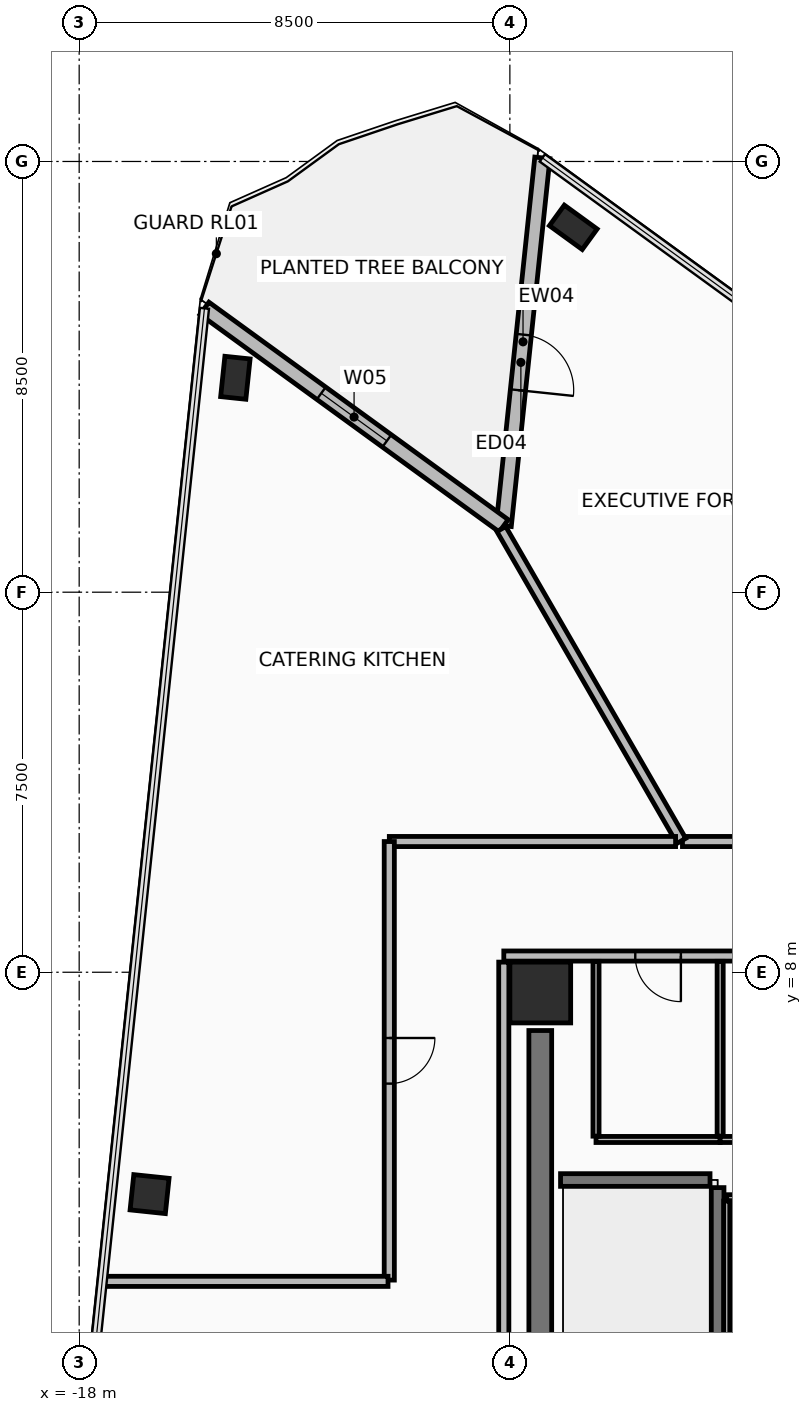
"""IFC4 building model, lengths in metres.
Left out: names, types, materials, properties, quantities, classifications, styles, units other than length and angle.
Written with IfcOpenShell. Run it as: python <this file> out.ifc"""

import sys

from ifc_helpers import new_model, si_unit, direction, frame, frame_2d, origin, origin_2d, place, context, subcontext, project, spatial, rectangle, hollow_rectangle, extrude, element, fill, save


model = new_model("IFC4")
c1 = context("Model", 3, precision=1e-05, world=origin(), true_north=direction((0.0, 1.0)))
c2 = subcontext(c1, "Body", "Model", "MODEL_VIEW")
j1 = project(units=[si_unit("LENGTHUNIT", "METRE"), si_unit("PLANEANGLEUNIT", "RADIAN")], contexts=[c1])
p1 = place(None, origin())
s1 = spatial("IfcSite", under=j1, at=p1, CompositionType="ELEMENT")
p2 = place(p1, origin())
s2 = spatial("IfcBuilding", under=s1, at=p2, CompositionType="ELEMENT")
p3 = place(p2, frame((0.0, 0.0, 130.45)))
s3 = spatial("IfcBuildingStorey", under=s2, at=p3, CompositionType="ELEMENT", Elevation=130.45)
p4 = place(p3, frame((-8.9, 7.6, 0.0), z_axis=(0.0, 0.0, 1.0), x_axis=(1.0, 0.0, 0.0)))
e1 = element("IfcColumn", 1, at=p4, inside=s3, PredefinedType="COLUMN", context=c2, shape_type="SweptSolid", body=[
    extrude(rectangle(XDim=1.2, YDim=1.2, at=origin_2d()), origin(), (0.0, 0.0, 1.0), 3.6),
])
p5 = place(p3, frame((-14.917, 19.731, 0.0), z_axis=(0.0, 0.0, 1.0), x_axis=(0.104530199036, 0.99452171293, 0.0)))
e2 = element("IfcColumn", 2, at=p5, inside=s3, PredefinedType="COLUMN", context=c2, shape_type="SweptSolid", body=[
    extrude(hollow_rectangle(XDim=0.5, YDim=0.8, WallThickness=0.04, at=origin_2d()), origin(), (0.0, 0.0, 1.0), 3.6),
])
p6 = place(p3, frame((-16.611, 3.622, 0.0), z_axis=(0.0, 0.0, 1.0), x_axis=(0.104530199036, 0.99452171293, 0.0)))
e3 = element("IfcColumn", 3, at=p6, inside=s3, PredefinedType="COLUMN", context=c2, shape_type="SweptSolid", body=[
    extrude(hollow_rectangle(XDim=0.7, YDim=0.7, WallThickness=0.04, at=origin_2d()), origin(), (0.0, 0.0, 1.0), 3.6),
])
p7 = place(p3, frame((-8.249, 22.701, 0.0), z_axis=(0.0, 0.0, 1.0), x_axis=(-0.809016994375, 0.587785252292, 0.0)))
e4 = element("IfcColumn", 4, at=p7, inside=s3, PredefinedType="COLUMN", context=c2, shape_type="SweptSolid", body=[
    extrude(hollow_rectangle(XDim=0.5, YDim=0.8, WallThickness=0.04, at=origin_2d()), origin(), (0.0, 0.0, 1.0), 3.6),
])
p8 = place(p3, frame((-8.859, 24.071, 0.0), z_axis=(0.0, 0.0, 1.0), x_axis=(-0.104512431924, -0.9945235802, 0.0)))
e5 = element("IfcWall", 5, at=p8, inside=s3, PredefinedType="STANDARD", context=c2, shape_type="SweptSolid", body=[
    extrude(rectangle(XDim=7.3, YDim=0.3, at=frame_2d((3.65, 0.0))), origin(), (0.0, 0.0, 1.0), 2.705),
])
p9 = place(p8, frame((3.508, 0.0, 0.0)))
e6 = element("IfcOpeningElement", 6, at=p9, cuts=e5, PredefinedType="OPENING", context=c2, shape_type="SweptSolid", body=[
    extrude(rectangle(XDim=1.1, YDim=2.2, at=frame_2d((0.55, 1.1))), frame((0.0, 0.16, 0.0), z_axis=(0.0, -1.0, 0.0), x_axis=(1.0, 0.0, 0.0)), (0.0, 0.0, 1.0), 0.32),
])
p10 = place(p3, frame((-9.622, 16.811, 0.0), z_axis=(0.0, 0.0, 1.0), x_axis=(-0.809002104592, 0.587805745775, 0.0)))
e7 = element("IfcWall", 7, at=p10, inside=s3, PredefinedType="STANDARD", context=c2, shape_type="SweptSolid", body=[
    extrude(rectangle(XDim=7.3, YDim=0.3, at=frame_2d((3.65, 0.0))), origin(), (0.0, 0.0, 1.0), 2.705),
])
p11 = place(p10, frame((2.85, 0.0, 0.325)))
e8 = element("IfcOpeningElement", 8, at=p11, cuts=e7, PredefinedType="OPENING", context=c2, shape_type="SweptSolid", body=[
    extrude(rectangle(XDim=1.6, YDim=2.2, at=frame_2d((0.8, 1.1))), frame((0.0, 0.16, 0.0), z_axis=(0.0, -1.0, 0.0), x_axis=(1.0, 0.0, 0.0)), (0.0, 0.0, 1.0), 0.32),
])
p12 = place(p3, frame((-8.9, -3.85, 0.0), z_axis=(0.0, 0.0, 1.0), x_axis=(0.0, 1.0, 0.0)))
e9 = element("IfcWall", 9, at=p12, inside=s3, PredefinedType="SHEAR", context=c2, shape_type="SweptSolid", body=[
    extrude(rectangle(XDim=10.7, YDim=0.45, at=frame_2d((5.35, 0.0))), origin(), (0.0, 0.0, 1.0), 3.41),
])
p13 = place(p3, frame((9.62, 8.32, 0.0), z_axis=(0.0, 0.0, 1.0), x_axis=(-1.0, 0.0, 0.0)))
e10 = element("IfcWall", 10, at=p13, inside=s3, PredefinedType="PARTITIONING", context=c2, shape_type="SweptSolid", body=[
    extrude(rectangle(XDim=19.24, YDim=0.2, at=frame_2d((9.62, 0.0))), origin(), (0.0, 0.0, 1.0), 2.755),
])
p14 = place(p13, frame((15.745, 0.0, 0.0)))
e11 = element("IfcOpeningElement", 11, at=p14, cuts=e10, PredefinedType="OPENING", context=c2, shape_type="SweptSolid", body=[
    extrude(rectangle(XDim=0.9, YDim=2.1, at=frame_2d((0.45, 1.05))), frame((0.0, 0.11, 0.0), z_axis=(0.0, -1.0, 0.0), x_axis=(1.0, 0.0, 0.0)), (0.0, 0.0, 1.0), 0.22),
])
p15 = place(p13, frame((13.795, 0.0, 0.0)))
e12 = element("IfcOpeningElement", 12, at=p15, cuts=e10, PredefinedType="OPENING", context=c2, shape_type="SweptSolid", body=[
    extrude(rectangle(XDim=0.9, YDim=2.1, at=frame_2d((0.45, 1.05))), frame((0.0, 0.11, 0.0), z_axis=(0.0, -1.0, 0.0), x_axis=(1.0, 0.0, 0.0)), (0.0, 0.0, 1.0), 0.22),
])
p16 = place(p3, frame((-9.62, 8.2, 0.0), z_axis=(0.0, 0.0, 1.0), x_axis=(0.0, -1.0, 0.0)))
e13 = element("IfcWall", 13, at=p16, inside=s3, PredefinedType="PARTITIONING", context=c2, shape_type="SweptSolid", body=[
    extrude(rectangle(XDim=16.4, YDim=0.2, at=frame_2d((8.2, 0.0))), origin(), (0.0, 0.0, 1.0), 2.855),
])
p17 = place(p16, frame((12.65, 0.0, 0.0)))
e14 = element("IfcOpeningElement", 14, at=p17, cuts=e13, PredefinedType="OPENING", context=c2, shape_type="SweptSolid", body=[
    extrude(rectangle(XDim=1.1, YDim=2.15, at=frame_2d((0.55, 1.075))), frame((0.0, 0.11, 0.0), z_axis=(0.0, -1.0, 0.0), x_axis=(1.0, 0.0, 0.0)), (0.0, 0.0, 1.0), 0.22),
])
p18 = place(p3, frame((-5.4, -3.55, 0.0), z_axis=(0.0, 0.0, 1.0), x_axis=(0.0, 1.0, 0.0)))
e15 = element("IfcWall", 15, at=p18, inside=s3, PredefinedType="SHEAR", context=c2, shape_type="SweptSolid", body=[
    extrude(rectangle(XDim=7.3, YDim=0.25, at=frame_2d((3.65, 0.0))), origin(), (0.0, 0.0, 1.0), 3.41),
])
p19 = place(p3, frame((-8.5, 3.9, 0.0), z_axis=(0.0, 0.0, 1.0), x_axis=(1.0, 0.0, 0.0)))
e16 = element("IfcWall", 16, at=p19, inside=s3, PredefinedType="SHEAR", context=c2, shape_type="SweptSolid", body=[
    extrude(rectangle(XDim=2.95, YDim=0.25, at=frame_2d((1.475, 0.0))), origin(), (0.0, 0.0, 1.0), 3.41),
])
p20 = place(p3, frame((-2.115, 3.55, 0.0), z_axis=(0.0, 0.0, 1.0), x_axis=(-1.0, 0.0, 0.0)))
e17 = element("IfcWall", 17, at=p20, inside=s3, PredefinedType="PARTITIONING", context=c2, shape_type="SweptSolid", body=[
    extrude(rectangle(XDim=3.105, YDim=0.12, at=frame_2d((1.552, 0.0))), origin(), (0.0, 0.0, 1.0), 3.41),
])
p21 = place(p3, frame((-5.22, 3.485, 0.0), z_axis=(0.0, 0.0, 1.0), x_axis=(0.0, -1.0, 0.0)))
e18 = element("IfcWall", 18, at=p21, inside=s3, PredefinedType="PARTITIONING", context=c2, shape_type="SweptSolid", body=[
    extrude(rectangle(XDim=2.97, YDim=0.12, at=frame_2d((1.485, 0.0))), origin(), (0.0, 0.0, 1.0), 3.41),
])
p22 = place(p3, frame((-7.8, 4.7, 0.0), z_axis=(0.0, 0.0, 1.0), x_axis=(1.0, 0.0, 0.0)))
e19 = element("IfcWall", 19, at=p22, inside=s3, PredefinedType="PARTITIONING", context=c2, shape_type="SweptSolid", body=[
    extrude(rectangle(XDim=2.45, YDim=0.12, at=frame_2d((1.225, 0.0))), origin(), (0.0, 0.0, 1.0), 3.41),
])
for number, where, z_axis, x_axis in (
    (20, (-5.35, 4.765, 0.0), (0.0, 0.0, 1.0), (0.0, 1.0, 0.0)),
    (21, (-7.8, 8.215, 0.0), (0.0, 0.0, 1.0), (0.0, -1.0, 0.0)),
):
    element("IfcWall", number, at=place(p3, frame(where, z_axis=z_axis, x_axis=x_axis)), inside=s3, PredefinedType="PARTITIONING", context=c2, shape_type="SweptSolid", body=[
        extrude(rectangle(XDim=3.45, YDim=0.12, at=frame_2d((1.725, 0.0))), origin(), (0.0, 0.0, 1.0), 2.605),
    ])
p23 = place(p3, frame((-5.35, 4.7, 0.0), z_axis=(0.0, 0.0, 1.0), x_axis=(1.0, 0.0, 0.0)))
e22 = element("IfcWall", 22, at=p23, inside=s3, PredefinedType="PARTITIONING", context=c2, shape_type="SweptSolid", body=[
    extrude(rectangle(XDim=1.45, YDim=0.12, at=frame_2d((0.725, 0.0))), origin(), (0.0, 0.0, 1.0), 3.41),
])
p24 = place(p3, frame((-2.025, 10.58, 0.0), z_axis=(0.0, 0.0, 1.0), x_axis=(-1.0, 0.0, 0.0)))
e23 = element("IfcWall", 23, at=p24, inside=s3, PredefinedType="PARTITIONING", context=c2, shape_type="SweptSolid", body=[
    extrude(rectangle(XDim=4.069, YDim=0.2, at=frame_2d((2.035, 0.0))), origin(), (0.0, 0.0, 1.0), 3.41),
])
p25 = place(p3, frame((-6.115, 10.593, 0.0), z_axis=(0.0, 0.0, 1.0), x_axis=(-0.50001885532, 0.866014517387, 0.0)))
e24 = element("IfcWall", 24, at=p25, inside=s3, PredefinedType="PARTITIONING", context=c2, shape_type="SweptSolid", body=[
    extrude(rectangle(XDim=7.106, YDim=0.2, at=frame_2d((3.553, 0.0))), origin(), (0.0, 0.0, 1.0), 2.855),
])
p26 = place(p3, frame((-6.229, 10.58, 0.0), z_axis=(0.0, 0.0, 1.0), x_axis=(-1.0, 0.0, 0.0)))
e25 = element("IfcWall", 25, at=p26, inside=s3, PredefinedType="PARTITIONING", context=c2, shape_type="SweptSolid", body=[
    extrude(rectangle(XDim=5.65, YDim=0.2, at=frame_2d((2.825, 0.0))), origin(), (0.0, 0.0, 1.0), 2.755),
])
p27 = place(p3, frame((-11.88, 10.579, 0.0), z_axis=(0.0, 0.0, 1.0), x_axis=(0.0, -1.0, 0.0)))
e26 = element("IfcWall", 26, at=p27, inside=s3, PredefinedType="PARTITIONING", context=c2, shape_type="SweptSolid", body=[
    extrude(rectangle(XDim=8.654, YDim=0.2, at=frame_2d((4.327, 0.0))), origin(), (0.0, 0.0, 1.0), 2.855),
])
p28 = place(p27, frame((3.877, 0.0, 0.0)))
e27 = element("IfcOpeningElement", 27, at=p28, cuts=e26, PredefinedType="OPENING", context=c2, shape_type="SweptSolid", body=[
    extrude(rectangle(XDim=0.9, YDim=2.1, at=frame_2d((0.45, 1.05))), frame((0.0, 0.11, 0.0), z_axis=(0.0, -1.0, 0.0), x_axis=(1.0, 0.0, 0.0)), (0.0, 0.0, 1.0), 0.22),
])
p29 = place(p3, frame((-11.905, 1.9, 0.0), z_axis=(0.0, 0.0, 1.0), x_axis=(-1.0, 0.0, 0.0)))
e28 = element("IfcWall", 28, at=p29, inside=s3, PredefinedType="PARTITIONING", context=c2, shape_type="SweptSolid", body=[
    extrude(rectangle(XDim=5.641, YDim=0.2, at=frame_2d((2.82, 0.0))), origin(), (0.0, 0.0, 1.0), 2.705),
])
p30 = place(p9, frame((1.1, 0.0, 0.0), z_axis=(0.0, 0.0, 1.0), x_axis=(-1.0, 0.0, 0.0)))
e29 = element("IfcDoor", 29, at=p30, inside=s3, OperationType="SINGLE_SWING_LEFT", PredefinedType="DOOR", context=c2, shape_type="SweptSolid", body=[
    extrude(rectangle(XDim=1.1, YDim=2.2, at=frame_2d((0.55, 1.1))), frame((0.0, 0.025, 0.0), z_axis=(0.0, -1.0, 0.0), x_axis=(1.0, 0.0, 0.0)), (0.0, 0.0, 1.0), 0.05),
])
fill(e6, e29)
p31 = place(p11, origin())
e30 = element("IfcWindow", 30, at=p31, inside=s3, PartitioningType="SINGLE_PANEL", PredefinedType="WINDOW", context=c2, shape_type="SweptSolid", body=[
    extrude(rectangle(XDim=1.6, YDim=2.2, at=frame_2d((0.8, 1.1))), frame((0.0, 0.03, 0.0), z_axis=(0.0, -1.0, 0.0), x_axis=(1.0, 0.0, 0.0)), (0.0, 0.0, 1.0), 0.06),
])
fill(e8, e30)
p32 = place(p14, origin())
e31 = element("IfcDoor", 31, at=p32, inside=s3, OperationType="SINGLE_SWING_LEFT", PredefinedType="DOOR", context=c2, shape_type="SweptSolid", body=[
    extrude(rectangle(XDim=0.9, YDim=2.1, at=frame_2d((0.45, 1.05))), frame((0.0, 0.025, 0.0), z_axis=(0.0, -1.0, 0.0), x_axis=(1.0, 0.0, 0.0)), (0.0, 0.0, 1.0), 0.05),
])
fill(e11, e31)
p33 = place(p28, origin())
e32 = element("IfcDoor", 32, at=p33, inside=s3, OperationType="SINGLE_SWING_LEFT", PredefinedType="DOOR", context=c2, shape_type="SweptSolid", body=[
    extrude(rectangle(XDim=0.9, YDim=2.1, at=frame_2d((0.45, 1.05))), frame((0.0, 0.025, 0.0), z_axis=(0.0, -1.0, 0.0), x_axis=(1.0, 0.0, 0.0)), (0.0, 0.0, 1.0), 0.05),
])
fill(e27, e32)
save(model, sys.argv[1])
